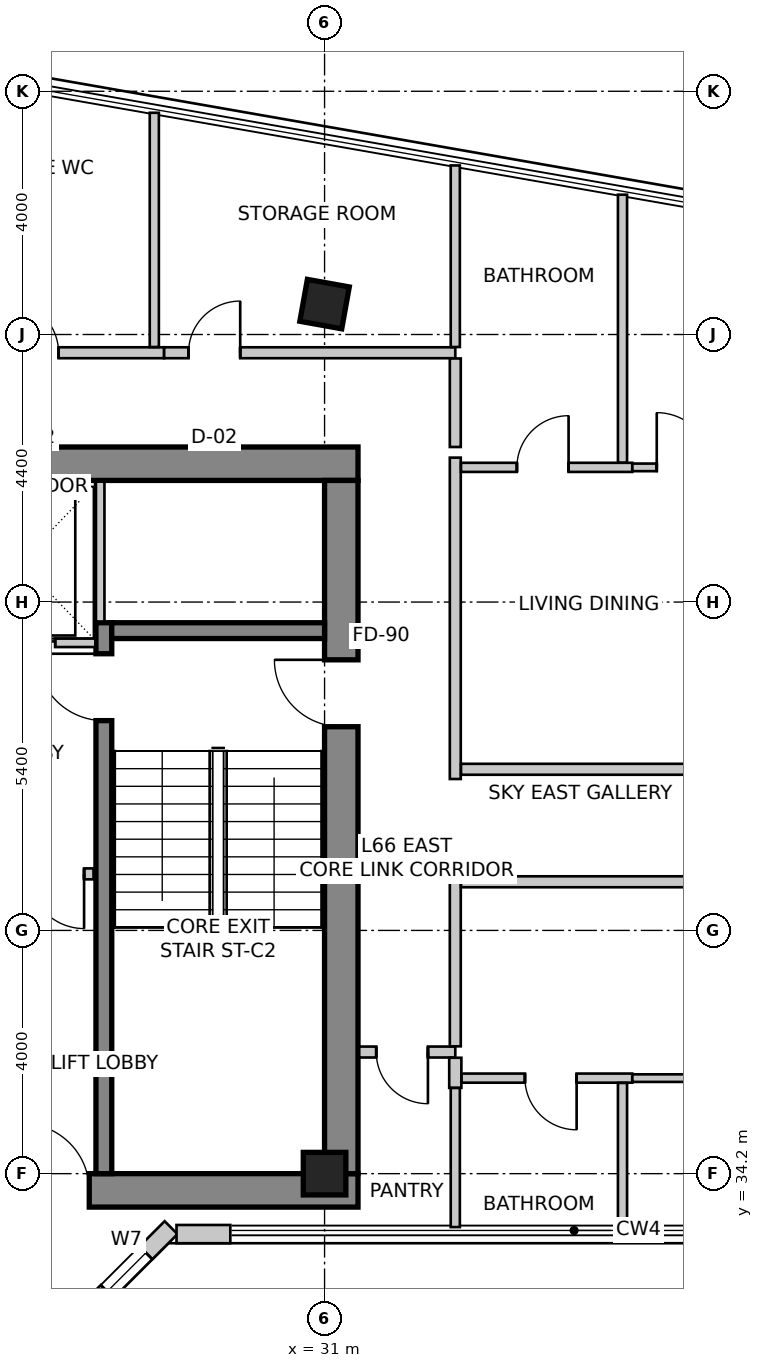
"""IFC4 building model, lengths in metres.
Left out: names, types, materials, properties, quantities, classifications, styles, units other than length and angle.
Written with IfcOpenShell. Run it as: python <this file> out.ifc"""

import sys

from ifc_helpers import new_model, si_unit, direction, frame, frame_2d, origin, origin_2d, place, context, subcontext, project, spatial, rectangle, extrude, source, transform, mapped, element, fill, save


model = new_model("IFC4")
c1 = context("Model", 3, precision=1e-05, world=origin(), true_north=direction((0.0, 1.0)))
c2 = subcontext(c1, "Body", "Model", "MODEL_VIEW")
j1 = project(units=[si_unit("LENGTHUNIT", "METRE"), si_unit("PLANEANGLEUNIT", "RADIAN")], contexts=[c1])
p1 = place(None, origin())
s1 = spatial("IfcSite", under=j1, at=p1, CompositionType="ELEMENT")
p2 = place(p1, origin())
s2 = spatial("IfcBuilding", under=s1, at=p2, CompositionType="ELEMENT")
p3 = place(p2, frame((0.0, 0.0, 260.1)))
s3 = spatial("IfcBuildingStorey", under=s2, at=p3, CompositionType="ELEMENT", Elevation=260.1)
p4 = place(p3, frame((16.05, 45.875, 0.0), z_axis=(0.0, 0.0, 1.0), x_axis=(1.0, 0.0, 0.0)))
e1 = element("IfcWall", 1, at=p4, inside=s3, PredefinedType="SHEAR", context=c2, shape_type="SweptSolid", body=[
    extrude(rectangle(XDim=15.5, YDim=0.55, at=frame_2d((7.75, 0.0))), origin(), (0.0, 0.0, 1.0), 3.6),
])
p5 = place(p3, frame((16.05, 33.925, 0.0), z_axis=(0.0, 0.0, 1.0), x_axis=(1.0, 0.0, 0.0)))
e2 = element("IfcWall", 2, at=p5, inside=s3, PredefinedType="SHEAR", context=c2, shape_type="SweptSolid", body=[
    extrude(rectangle(XDim=15.5, YDim=0.55, at=frame_2d((7.75, 0.0))), origin(), (0.0, 0.0, 1.0), 3.6),
])
m1 = source(origin(), c2, "Body", "SweptSolid", [
    extrude(rectangle(XDim=1.1, YDim=2.15, at=frame_2d((0.55, 1.075))), frame((0.0, 0.285, 0.0), z_axis=(0.0, -1.0, 0.0), x_axis=(1.0, 0.0, 0.0)), (0.0, 0.0, 1.0), 0.57),
])
p6 = place(p5, frame((9.98, 0.0, 0.0)))
e3 = element("IfcOpeningElement", 3, at=p6, cuts=e2, PredefinedType="OPENING", context=c2, shape_type="MappedRepresentation", body=[
    mapped(m1, transform((0.0, 0.0, 0.0), scale=1.0)),
])
p7 = place(p3, frame((31.275, 34.2, 0.0), z_axis=(0.0, 0.0, 1.0), x_axis=(0.0, 1.0, 0.0)))
e4 = element("IfcWall", 4, at=p7, inside=s3, PredefinedType="SHEAR", context=c2, shape_type="SweptSolid", body=[
    extrude(rectangle(XDim=11.4, YDim=0.55, at=frame_2d((5.7, 0.0))), origin(), (0.0, 0.0, 1.0), 3.6),
])
p8 = place(p7, frame((7.35, 0.0, 0.0)))
e5 = element("IfcOpeningElement", 5, at=p8, cuts=e4, PredefinedType="OPENING", context=c2, shape_type="MappedRepresentation", body=[
    mapped(m1, transform((0.0, 0.0, 0.0), scale=1.0)),
])
p9 = place(p3, frame((27.37, 34.2, 0.0), z_axis=(0.0, 0.0, 1.0), x_axis=(0.0, 1.0, 0.0)))
e6 = element("IfcWall", 6, at=p9, inside=s3, PredefinedType="SHEAR", context=c2, shape_type="SweptSolid", body=[
    extrude(rectangle(XDim=9.06, YDim=0.26, at=frame_2d((4.53, 0.0))), origin(), (0.0, 0.0, 1.0), 3.6),
])
m2 = source(origin(), c2, "Body", "SweptSolid", [
    extrude(rectangle(XDim=1.1, YDim=2.15, at=frame_2d((0.55, 1.075))), frame((0.0, 0.14, 0.0), z_axis=(0.0, -1.0, 0.0), x_axis=(1.0, 0.0, 0.0)), (0.0, 0.0, 1.0), 0.28),
])
p10 = place(p9, frame((7.45, 0.0, 0.0)))
e7 = element("IfcOpeningElement", 7, at=p10, cuts=e6, PredefinedType="OPENING", context=c2, shape_type="MappedRepresentation", body=[
    mapped(m2, transform((0.0, 0.0, 0.0), scale=1.0)),
])
p11 = place(p3, frame((27.5, 43.13, 0.0), z_axis=(0.0, 0.0, 1.0), x_axis=(1.0, 0.0, 0.0)))
e8 = element("IfcWall", 8, at=p11, inside=s3, PredefinedType="SHEAR", context=c2, shape_type="SweptSolid", body=[
    extrude(rectangle(XDim=3.5, YDim=0.26, at=frame_2d((1.75, 0.0))), origin(), (0.0, 0.0, 1.0), 3.6),
])
m3 = source(origin(), c2, "Body", "SweptSolid", [
    extrude(rectangle(XDim=0.7, YDim=0.7, at=origin_2d()), origin(), (0.0, 0.0, 1.0), 3.6),
])
for number, where, z_axis, x_axis in (
    (9, (31.0, 48.5, 0.0), (0.0, 0.0, 1.0), (0.984, -0.177, 0.0)),
    (10, (31.0, 34.2, 0.0), (0.0, 0.0, 1.0), (1.0, 0.0, 0.0)),
):
    element("IfcColumn", number, at=place(p3, frame(where, z_axis=z_axis, x_axis=x_axis)), inside=s3, PredefinedType="COLUMN", context=c2, shape_type="MappedRepresentation", body=[
        mapped(m3, transform((0.0, 0.0, 0.0), scale=1.0)),
    ])
p12 = place(p3, frame((26.42, 31.256, 0.0), z_axis=(0.0, 0.0, 1.0), x_axis=(0.707106781187, 0.707106781187, 0.0)))
e11 = element("IfcWall", 11, at=p12, inside=s3, PredefinedType="SOLIDWALL", context=c2, shape_type="SweptSolid", body=[
    extrude(rectangle(XDim=2.907, YDim=0.3, at=frame_2d((1.454, 0.0))), origin(), (0.0, 0.0, 1.0), 3.35),
])
m4 = source(origin(), c2, "Body", "SweptSolid", [
    extrude(rectangle(XDim=0.9, YDim=1.6, at=frame_2d((0.45, 0.8))), frame((0.0, 0.16, 0.0), z_axis=(0.0, -1.0, 0.0), x_axis=(1.0, 0.0, 0.0)), (0.0, 0.0, 1.0), 0.32),
])
p13 = place(p12, frame((1.422, 0.0, 0.85)))
e12 = element("IfcOpeningElement", 12, at=p13, cuts=e11, PredefinedType="OPENING", context=c2, shape_type="MappedRepresentation", body=[
    mapped(m4, transform((0.0, 0.0, 0.0), scale=1.0)),
])
p14 = place(p3, frame((28.565, 33.206, 0.0), z_axis=(0.0, 0.0, 1.0), x_axis=(1.0, 0.0, 0.0)))
e13 = element("IfcWall", 13, at=p14, inside=s3, PredefinedType="SOLIDWALL", context=c2, shape_type="SweptSolid", body=[
    extrude(rectangle(XDim=0.885, YDim=0.3, at=frame_2d((0.442, 0.0))), origin(), (0.0, 0.0, 1.0), 3.35),
])
p15 = place(p3, frame((20.37, 42.93, 0.0), z_axis=(0.0, 0.0, 1.0), x_axis=(1.0, 0.0, 0.0)))
e14 = element("IfcWall", 14, at=p15, inside=s3, PredefinedType="SOLIDWALL", context=c2, shape_type="SweptSolid", body=[
    extrude(rectangle(XDim=6.86, YDim=0.14, at=frame_2d((3.43, 0.0))), origin(), (0.0, 0.0, 1.0), 3.35),
])
m5 = source(origin(), c2, "Body", "SweptSolid", [
    extrude(rectangle(XDim=1.1, YDim=2.15, at=frame_2d((0.55, 1.075))), frame((0.0, 0.08, 0.0), z_axis=(0.0, -1.0, 0.0), x_axis=(1.0, 0.0, 0.0)), (0.0, 0.0, 1.0), 0.16),
])
p16 = place(p15, frame((0.5, 0.0, 0.0)))
e15 = element("IfcOpeningElement", 15, at=p16, cuts=e14, PredefinedType="OPENING", context=c2, shape_type="MappedRepresentation", body=[
    mapped(m5, transform((0.0, 0.0, 0.0), scale=1.0)),
])
p17 = place(p15, frame((2.7, 0.0, 0.0)))
e16 = element("IfcOpeningElement", 16, at=p17, cuts=e14, PredefinedType="OPENING", context=c2, shape_type="MappedRepresentation", body=[
    mapped(m5, transform((0.0, 0.0, 0.0), scale=1.0)),
])
p18 = place(p15, frame((5.1, 0.0, 0.0)))
e17 = element("IfcOpeningElement", 17, at=p18, cuts=e14, PredefinedType="OPENING", context=c2, shape_type="MappedRepresentation", body=[
    mapped(m5, transform((0.0, 0.0, 0.0), scale=1.0)),
])
p19 = place(p3, frame((27.31, 43.28, 0.0), z_axis=(0.0, 0.0, 1.0), x_axis=(0.0, 1.0, 0.0)))
e18 = element("IfcWall", 18, at=p19, inside=s3, PredefinedType="SOLIDWALL", context=c2, shape_type="SweptSolid", body=[
    extrude(rectangle(XDim=2.3, YDim=0.14, at=frame_2d((1.15, 0.0))), origin(), (0.0, 0.0, 1.0), 3.35),
])
p20 = place(p3, frame((27.2, 39.13, 0.0), z_axis=(0.0, 0.0, 1.0), x_axis=(-1.0, 0.0, 0.0)))
e19 = element("IfcWall", 19, at=p20, inside=s3, PredefinedType="PARTITIONING", context=c2, shape_type="SweptSolid", body=[
    extrude(rectangle(XDim=1.21, YDim=0.18, at=frame_2d((0.605, 0.0))), origin(), (0.0, 0.0, 1.0), 3.35),
])
m6 = source(origin(), c2, "Body", "SweptSolid", [
    extrude(rectangle(XDim=0.9, YDim=2.15, at=frame_2d((0.45, 1.075))), frame((0.0, 0.1, 0.0), z_axis=(0.0, -1.0, 0.0), x_axis=(1.0, 0.0, 0.0)), (0.0, 0.0, 1.0), 0.2),
])
p21 = place(p20, frame((0.155, 0.0, 0.0)))
e20 = element("IfcOpeningElement", 20, at=p21, cuts=e19, PredefinedType="OPENING", context=c2, shape_type="MappedRepresentation", body=[
    mapped(m6, transform((0.0, 0.0, 0.0), scale=1.0)),
])
p22 = place(p3, frame((24.162, 47.7, 0.0), z_axis=(0.0, 0.0, 1.0), x_axis=(1.0, 0.0, 0.0)))
e21 = element("IfcWall", 21, at=p22, inside=s3, PredefinedType="PARTITIONING", context=c2, shape_type="SweptSolid", body=[
    extrude(rectangle(XDim=4.198, YDim=0.18, at=frame_2d((2.099, 0.0))), origin(), (0.0, 0.0, 1.0), 3.35),
])
m7 = source(origin(), c2, "Body", "SweptSolid", [
    extrude(rectangle(XDim=0.85, YDim=2.15, at=frame_2d((0.425, 1.075))), frame((0.0, 0.1, 0.0), z_axis=(0.0, -1.0, 0.0), x_axis=(1.0, 0.0, 0.0)), (0.0, 0.0, 1.0), 0.2),
])
p23 = place(p22, frame((1.613, 0.0, 0.0)))
e22 = element("IfcOpeningElement", 22, at=p23, cuts=e21, PredefinedType="OPENING", context=c2, shape_type="MappedRepresentation", body=[
    mapped(m7, transform((0.0, 0.0, 0.0), scale=1.0)),
])
p24 = place(p3, frame((28.362, 47.7, 0.0), z_axis=(0.0, 0.0, 1.0), x_axis=(1.0, 0.0, 0.0)))
e23 = element("IfcWall", 23, at=p24, inside=s3, PredefinedType="PARTITIONING", context=c2, shape_type="SweptSolid", body=[
    extrude(rectangle(XDim=4.788, YDim=0.18, at=frame_2d((2.394, 0.0))), origin(), (0.0, 0.0, 1.0), 2.788),
])
p25 = place(p24, frame((0.401, 0.0, 0.0)))
e24 = element("IfcOpeningElement", 24, at=p25, cuts=e23, PredefinedType="OPENING", context=c2, shape_type="MappedRepresentation", body=[
    mapped(m7, transform((0.0, 0.0, 0.0), scale=1.0)),
])
p26 = place(p3, frame((33.15, 47.606, 0.0), z_axis=(0.0, 0.0, 1.0), x_axis=(0.0, -1.0, 0.0)))
e25 = element("IfcWall", 25, at=p26, inside=s3, PredefinedType="PARTITIONING", context=c2, shape_type="SweptSolid", body=[
    extrude(rectangle(XDim=1.456, YDim=0.18, at=frame_2d((0.728, 0.0))), origin(), (0.0, 0.0, 1.0), 3.35),
])
p27 = place(p3, frame((33.15, 36.2, 0.0), z_axis=(0.0, 0.0, 1.0), x_axis=(-1.0, 0.0, 0.0)))
e26 = element("IfcWall", 26, at=p27, inside=s3, PredefinedType="PARTITIONING", context=c2, shape_type="SweptSolid", body=[
    extrude(rectangle(XDim=1.58, YDim=0.18, at=frame_2d((0.79, 0.0))), origin(), (0.0, 0.0, 1.0), 3.35),
])
p28 = place(p27, frame((0.45, 0.0, 0.0)))
e27 = element("IfcOpeningElement", 27, at=p28, cuts=e26, PredefinedType="OPENING", context=c2, shape_type="MappedRepresentation", body=[
    mapped(m7, transform((0.0, 0.0, 0.0), scale=1.0)),
])
p29 = place(p3, frame((33.15, 45.975, 0.0), z_axis=(0.0, 0.0, 1.0), x_axis=(0.0, -1.0, 0.0)))
e28 = element("IfcWall", 28, at=p29, inside=s3, PredefinedType="PARTITIONING", context=c2, shape_type="SweptSolid", body=[
    extrude(rectangle(XDim=5.285, YDim=0.18, at=frame_2d((2.643, 0.0))), origin(), (0.0, 0.0, 1.0), 2.788),
])
p30 = place(p3, frame((33.15, 39.16, 0.0), z_axis=(0.0, 0.0, 1.0), x_axis=(0.0, -1.0, 0.0)))
e29 = element("IfcWall", 29, at=p30, inside=s3, PredefinedType="PARTITIONING", context=c2, shape_type="SweptSolid", body=[
    extrude(rectangle(XDim=2.866, YDim=0.18, at=frame_2d((1.433, 0.0))), origin(), (0.0, 0.0, 1.0), 3.35),
])
p31 = place(p3, frame((28.2, 51.646, 0.0), z_axis=(0.0, 0.0, 1.0), x_axis=(0.0, -1.0, 0.0)))
e30 = element("IfcWall", 30, at=p31, inside=s3, PredefinedType="PARTITIONING", context=c2, shape_type="SweptSolid", body=[
    extrude(rectangle(XDim=3.852, YDim=0.15, at=frame_2d((1.926, 0.0))), origin(), (0.0, 0.0, 1.0), 2.642),
])
p32 = place(p3, frame((33.15, 50.78, 0.0), z_axis=(0.0, 0.0, 1.0), x_axis=(0.0, -1.0, 0.0)))
e31 = element("IfcWall", 31, at=p32, inside=s3, PredefinedType="PARTITIONING", context=c2, shape_type="SweptSolid", body=[
    extrude(rectangle(XDim=2.986, YDim=0.15, at=frame_2d((1.493, 0.0))), origin(), (0.0, 0.0, 1.0), 2.642),
])
p33 = place(p3, frame((33.244, 40.85, 0.0), z_axis=(0.0, 0.0, 1.0), x_axis=(1.0, 0.0, 0.0)))
e32 = element("IfcWall", 32, at=p33, inside=s3, PredefinedType="PARTITIONING", context=c2, shape_type="SweptSolid", body=[
    extrude(rectangle(XDim=8.291, YDim=0.18, at=frame_2d((4.146, 0.0))), origin(), (0.0, 0.0, 1.0), 2.935),
])
p34 = place(p33, frame((3.696, 0.0, 0.0)))
e33 = element("IfcOpeningElement", 33, at=p34, cuts=e32, PredefinedType="OPENING", context=c2, shape_type="MappedRepresentation", body=[
    mapped(m6, transform((0.0, 0.0, 0.0), scale=1.0)),
])
p35 = place(p3, frame((41.535, 39.0, 0.0), z_axis=(0.0, 0.0, 1.0), x_axis=(-1.0, 0.0, 0.0)))
e34 = element("IfcWall", 34, at=p35, inside=s3, PredefinedType="PARTITIONING", context=c2, shape_type="SweptSolid", body=[
    extrude(rectangle(XDim=8.291, YDim=0.18, at=frame_2d((4.146, 0.0))), origin(), (0.0, 0.0, 1.0), 2.935),
])
p36 = place(p35, frame((3.696, 0.0, 0.0)))
e35 = element("IfcOpeningElement", 35, at=p36, cuts=e34, PredefinedType="OPENING", context=c2, shape_type="MappedRepresentation", body=[
    mapped(m6, transform((0.0, 0.0, 0.0), scale=1.0)),
])
p37 = place(p3, frame((33.15, 36.106, 0.0), z_axis=(0.0, 0.0, 1.0), x_axis=(0.0, -1.0, 0.0)))
e36 = element("IfcWall", 36, at=p37, inside=s3, PredefinedType="PARTITIONING", context=c2, shape_type="SweptSolid", body=[
    extrude(rectangle(XDim=0.495, YDim=0.2, at=frame_2d((0.248, 0.0))), origin(), (0.0, 0.0, 1.0), 3.35),
])
p38 = place(p3, frame((33.15, 35.609, 0.0), z_axis=(0.0, 0.0, 1.0), x_axis=(0.0, -1.0, 0.0)))
e37 = element("IfcWall", 37, at=p38, inside=s3, PredefinedType="PARTITIONING", context=c2, shape_type="SweptSolid", body=[
    extrude(rectangle(XDim=2.288, YDim=0.15, at=frame_2d((1.144, 0.0))), origin(), (0.0, 0.0, 1.0), 3.35),
])
p39 = place(p3, frame((33.244, 45.815, 0.0), z_axis=(0.0, 0.0, 1.0), x_axis=(1.0, 0.0, 0.0)))
e38 = element("IfcWall", 38, at=p39, inside=s3, PredefinedType="PARTITIONING", context=c2, shape_type="SweptSolid", body=[
    extrude(rectangle(XDim=2.816, YDim=0.15, at=frame_2d((1.408, 0.0))), origin(), (0.0, 0.0, 1.0), 2.788),
])
m8 = source(origin(), c2, "Body", "SweptSolid", [
    extrude(rectangle(XDim=0.85, YDim=2.15, at=frame_2d((0.425, 1.075))), frame((0.0, 0.085, 0.0), z_axis=(0.0, -1.0, 0.0), x_axis=(1.0, 0.0, 0.0)), (0.0, 0.0, 1.0), 0.17),
])
p40 = place(p39, frame((0.919, 0.0, 0.0)))
e39 = element("IfcOpeningElement", 39, at=p40, cuts=e38, PredefinedType="OPENING", context=c2, shape_type="MappedRepresentation", body=[
    mapped(m8, transform((0.0, 0.0, 0.0), scale=1.0)),
])
p41 = place(p3, frame((36.062, 45.815, 0.0), z_axis=(0.0, 0.0, 1.0), x_axis=(1.0, 0.0, 0.0)))
e40 = element("IfcWall", 40, at=p41, inside=s3, PredefinedType="PARTITIONING", context=c2, shape_type="SweptSolid", body=[
    extrude(rectangle(XDim=4.615, YDim=0.125, at=frame_2d((2.308, 0.0))), origin(), (0.0, 0.0, 1.0), 2.979),
])
m9 = source(origin(), c2, "Body", "SweptSolid", [
    extrude(rectangle(XDim=0.9, YDim=2.15, at=frame_2d((0.45, 1.075))), frame((0.0, 0.073, 0.0), z_axis=(0.0, -1.0, 0.0), x_axis=(1.0, 0.0, 0.0)), (0.0, 0.0, 1.0), 0.145),
])
p42 = place(p41, frame((0.401, 0.0, 0.0)))
e41 = element("IfcOpeningElement", 41, at=p42, cuts=e40, PredefinedType="OPENING", context=c2, shape_type="MappedRepresentation", body=[
    mapped(m9, transform((0.0, 0.0, 0.0), scale=1.0)),
])
p43 = place(p3, frame((35.9, 50.299, 0.0), z_axis=(0.0, 0.0, 1.0), x_axis=(0.0, -1.0, 0.0)))
e42 = element("IfcWall", 42, at=p43, inside=s3, PredefinedType="PARTITIONING", context=c2, shape_type="SweptSolid", body=[
    extrude(rectangle(XDim=4.405, YDim=0.15, at=frame_2d((2.203, 0.0))), origin(), (0.0, 0.0, 1.0), 2.642),
])
p44 = place(p3, frame((36.06, 35.771, 0.0), z_axis=(0.0, 0.0, 1.0), x_axis=(-1.0, 0.0, 0.0)))
e43 = element("IfcWall", 43, at=p44, inside=s3, PredefinedType="PARTITIONING", context=c2, shape_type="SweptSolid", body=[
    extrude(rectangle(XDim=2.806, YDim=0.15, at=frame_2d((1.403, 0.0))), origin(), (0.0, 0.0, 1.0), 3.35),
])
p45 = place(p44, frame((0.915, 0.0, 0.0)))
e44 = element("IfcOpeningElement", 44, at=p45, cuts=e43, PredefinedType="OPENING", context=c2, shape_type="MappedRepresentation", body=[
    mapped(m8, transform((0.0, 0.0, 0.0), scale=1.0)),
])
p46 = place(p3, frame((41.469, 35.771, 0.0), z_axis=(0.0, 0.0, 1.0), x_axis=(-1.0, 0.0, 0.0)))
e45 = element("IfcWall", 45, at=p46, inside=s3, PredefinedType="PARTITIONING", context=c2, shape_type="SweptSolid", body=[
    extrude(rectangle(XDim=5.406, YDim=0.125, at=frame_2d((2.703, 0.0))), origin(), (0.0, 0.0, 1.0), 2.935),
])
p47 = place(p46, frame((0.527, 0.0, 0.0)))
e46 = element("IfcOpeningElement", 46, at=p47, cuts=e45, PredefinedType="OPENING", context=c2, shape_type="MappedRepresentation", body=[
    mapped(m9, transform((0.0, 0.0, 0.0), scale=1.0)),
])
p48 = place(p3, frame((35.9, 35.692, 0.0), z_axis=(0.0, 0.0, 1.0), x_axis=(0.0, -1.0, 0.0)))
e47 = element("IfcWall", 47, at=p48, inside=s3, PredefinedType="PARTITIONING", context=c2, shape_type="SweptSolid", body=[
    extrude(rectangle(XDim=2.371, YDim=0.15, at=frame_2d((1.186, 0.0))), origin(), (0.0, 0.0, 1.0), 3.35),
])
m10 = source(origin(), c2, "Body", "SweptSolid", [
    extrude(rectangle(XDim=0.9, YDim=1.6, at=frame_2d((0.45, 0.8))), frame((0.0, -0.015, 0.0), z_axis=(0.0, -1.0, 0.0), x_axis=(1.0, 0.0, 0.0)), (0.0, 0.0, 1.0), 0.06),
])
p49 = place(p13, origin())
e48 = element("IfcWindow", 48, at=p49, inside=s3, PartitioningType="SINGLE_PANEL", PredefinedType="WINDOW", context=c2, shape_type="MappedRepresentation", body=[
    mapped(m10, transform((0.0, 0.0, 0.0), scale=1.0)),
])
fill(e12, e48)
m11 = source(origin(), c2, "Body", "SweptSolid", [
    extrude(rectangle(XDim=1.1, YDim=2.15, at=frame_2d((0.55, 1.075))), frame((0.0, 0.025, 0.0), z_axis=(0.0, -1.0, 0.0), x_axis=(1.0, 0.0, 0.0)), (0.0, 0.0, 1.0), 0.05),
])
p50 = place(p18, origin())
e49 = element("IfcDoor", 49, at=p50, inside=s3, OperationType="SLIDING_TO_LEFT", PredefinedType="DOOR", context=c2, shape_type="MappedRepresentation", body=[
    mapped(m11, transform((0.0, 0.0, 0.0), scale=1.0)),
])
fill(e17, e49)
m12 = source(origin(), c2, "Body", "SweptSolid", [
    extrude(rectangle(XDim=1.1, YDim=2.15, at=frame_2d((0.55, 1.075))), frame((0.0, 0.025, 0.0), z_axis=(0.0, -1.0, 0.0), x_axis=(1.0, 0.0, 0.0)), (0.0, 0.0, 1.0), 0.05),
])
p51 = place(p10, origin())
e50 = element("IfcDoor", 50, at=p51, inside=s3, OperationType="SINGLE_SWING_RIGHT", PredefinedType="DOOR", context=c2, shape_type="MappedRepresentation", body=[
    mapped(m12, transform((0.0, 0.0, 0.0), scale=1.0)),
])
fill(e7, e50)
p52 = place(p8, origin())
e51 = element("IfcDoor", 51, at=p52, inside=s3, OperationType="SINGLE_SWING_RIGHT", PredefinedType="DOOR", context=c2, shape_type="MappedRepresentation", body=[
    mapped(m12, transform((0.0, 0.0, 0.0), scale=1.0)),
])
fill(e5, e51)
p53 = place(p6, origin())
e52 = element("IfcDoor", 52, at=p53, inside=s3, OperationType="SINGLE_SWING_LEFT", PredefinedType="DOOR", context=c2, shape_type="MappedRepresentation", body=[
    mapped(m12, transform((0.0, 0.0, 0.0), scale=1.0)),
])
fill(e3, e52)
m13 = source(origin(), c2, "Body", "SweptSolid", [
    extrude(rectangle(XDim=0.9, YDim=2.15, at=frame_2d((0.45, 1.075))), frame((0.0, 0.025, 0.0), z_axis=(0.0, -1.0, 0.0), x_axis=(1.0, 0.0, 0.0)), (0.0, 0.0, 1.0), 0.05),
])
p54 = place(p21, origin())
e53 = element("IfcDoor", 53, at=p54, inside=s3, OperationType="SINGLE_SWING_LEFT", PredefinedType="DOOR", context=c2, shape_type="MappedRepresentation", body=[
    mapped(m13, transform((0.0, 0.0, 0.0), scale=1.0)),
])
fill(e20, e53)
m14 = source(origin(), c2, "Body", "SweptSolid", [
    extrude(rectangle(XDim=0.85, YDim=2.15, at=frame_2d((0.425, 1.075))), frame((0.0, 0.025, 0.0), z_axis=(0.0, -1.0, 0.0), x_axis=(1.0, 0.0, 0.0)), (0.0, 0.0, 1.0), 0.05),
])
p55 = place(p23, origin())
e54 = element("IfcDoor", 54, at=p55, inside=s3, OperationType="SINGLE_SWING_LEFT", PredefinedType="DOOR", context=c2, shape_type="MappedRepresentation", body=[
    mapped(m14, transform((0.0, 0.0, 0.0), scale=1.0)),
])
fill(e22, e54)
p56 = place(p25, origin())
e55 = element("IfcDoor", 55, at=p56, inside=s3, OperationType="SINGLE_SWING_RIGHT", PredefinedType="DOOR", context=c2, shape_type="MappedRepresentation", body=[
    mapped(m14, transform((0.0, 0.0, 0.0), scale=1.0)),
])
fill(e24, e55)
p57 = place(p28, origin())
e56 = element("IfcDoor", 56, at=p57, inside=s3, OperationType="SINGLE_SWING_LEFT", PredefinedType="DOOR", context=c2, shape_type="MappedRepresentation", body=[
    mapped(m14, transform((0.0, 0.0, 0.0), scale=1.0)),
])
fill(e27, e56)
p58 = place(p40, origin())
e57 = element("IfcDoor", 57, at=p58, inside=s3, OperationType="SINGLE_SWING_RIGHT", PredefinedType="DOOR", context=c2, shape_type="MappedRepresentation", body=[
    mapped(m14, transform((0.0, 0.0, 0.0), scale=1.0)),
])
fill(e39, e57)
m15 = source(origin(), c2, "Body", "SweptSolid", [
    extrude(rectangle(XDim=0.9, YDim=2.15, at=frame_2d((0.45, 1.075))), frame((0.0, 0.025, 0.0), z_axis=(0.0, -1.0, 0.0), x_axis=(1.0, 0.0, 0.0)), (0.0, 0.0, 1.0), 0.05),
])
p59 = place(p42, origin())
e58 = element("IfcDoor", 58, at=p59, inside=s3, OperationType="SINGLE_SWING_LEFT", PredefinedType="DOOR", context=c2, shape_type="MappedRepresentation", body=[
    mapped(m15, transform((0.0, 0.0, 0.0), scale=1.0)),
])
fill(e41, e58)
p60 = place(p45, origin())
e59 = element("IfcDoor", 59, at=p60, inside=s3, OperationType="SINGLE_SWING_LEFT", PredefinedType="DOOR", context=c2, shape_type="MappedRepresentation", body=[
    mapped(m14, transform((0.0, 0.0, 0.0), scale=1.0)),
])
fill(e44, e59)
save(model, sys.argv[1])
